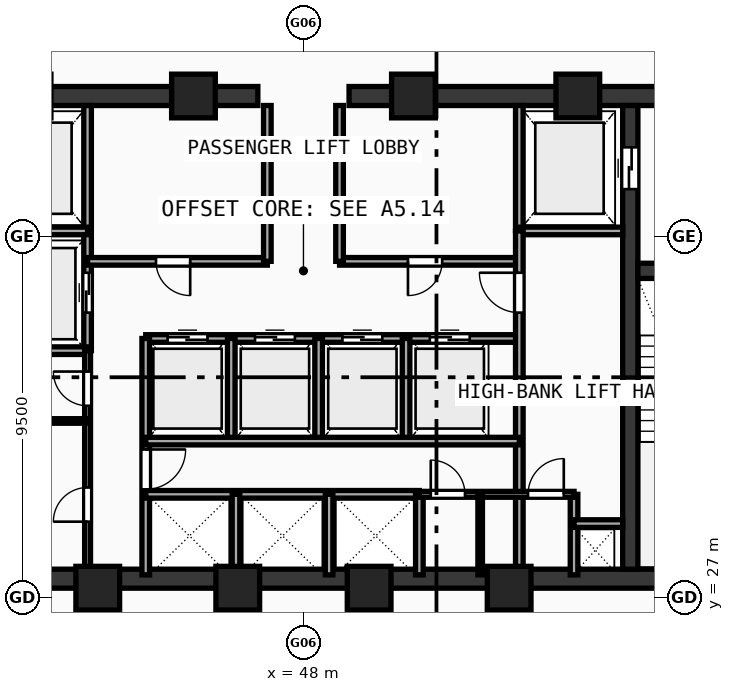
"""IFC4 building model, lengths in metres.
Left out: names, types, materials, properties, quantities, classifications, styles, units other than length and angle.
Written with IfcOpenShell. Run it as: python <this file> out.ifc"""

import sys

from ifc_helpers import new_model, si_unit, direction, frame, frame_2d, origin, origin_with_axes, origin_2d, place, context, subcontext, project, spatial, rectangle, hollow_rectangle, extrude, source, transform, mapped, element, fill, save


model = new_model("IFC4")
c1 = context("Model", 3, precision=1e-05, world=origin(), true_north=direction((0.0, 1.0)))
c2 = subcontext(c1, "Body", "Model", "MODEL_VIEW")
j1 = project(units=[si_unit("LENGTHUNIT", "METRE"), si_unit("PLANEANGLEUNIT", "RADIAN")], contexts=[c1])
p1 = place(None, origin())
s1 = spatial("IfcSite", under=j1, at=p1, CompositionType="ELEMENT")
p2 = place(p1, origin())
s2 = spatial("IfcBuilding", under=s1, at=p2, CompositionType="ELEMENT")
p3 = place(p2, frame((0.0, 0.0, 203.76)))
s3 = spatial("IfcBuildingStorey", under=s2, at=p3, CompositionType="ELEMENT", Elevation=203.76)
p4 = place(p3, frame((35.55, 27.5, 0.0), z_axis=(0.0, 0.0, 1.0), x_axis=(1.0, 0.0, 0.0)))
e1 = element("IfcWall", 1, at=p4, inside=s3, PredefinedType="SHEAR", context=c2, shape_type="SweptSolid", body=[
    extrude(rectangle(XDim=24.9, YDim=0.5, at=frame_2d((12.45, 0.0))), origin(), (0.0, 0.0, 1.0), 3.54),
])
p5 = place(p3, frame((35.55, 40.2, 0.0), z_axis=(0.0, 0.0, 1.0), x_axis=(1.0, 0.0, 0.0)))
e2 = element("IfcWall", 2, at=p5, inside=s3, PredefinedType="SHEAR", context=c2, shape_type="SweptSolid", body=[
    extrude(rectangle(XDim=11.25, YDim=0.5, at=frame_2d((5.625, 0.0))), origin(), (0.0, 0.0, 1.0), 3.54),
])
p6 = place(p5, frame((1.6, 0.0, 0.0)))
e3 = element("IfcOpeningElement", 3, at=p6, cuts=e2, PredefinedType="OPENING", context=c2, shape_type="SweptSolid", body=[
    extrude(rectangle(XDim=1.05, YDim=2.1, at=frame_2d((0.525, 1.05))), frame((0.0, 0.26, 0.0), z_axis=(0.0, -1.0, 0.0), x_axis=(1.0, 0.0, 0.0)), (0.0, 0.0, 1.0), 0.52),
])
p7 = place(p3, frame((49.2, 40.2, 0.0), z_axis=(0.0, 0.0, 1.0), x_axis=(1.0, 0.0, 0.0)))
e4 = element("IfcWall", 4, at=p7, inside=s3, PredefinedType="SHEAR", context=c2, shape_type="SweptSolid", body=[
    extrude(rectangle(XDim=11.25, YDim=0.5, at=frame_2d((5.625, 0.0))), origin(), (0.0, 0.0, 1.0), 3.54),
])
p8 = place(p7, frame((8.6, 0.0, 0.0)))
e5 = element("IfcOpeningElement", 5, at=p8, cuts=e4, PredefinedType="OPENING", context=c2, shape_type="SweptSolid", body=[
    extrude(rectangle(XDim=1.05, YDim=2.1, at=frame_2d((0.525, 1.05))), frame((0.0, 0.26, 0.0), z_axis=(0.0, -1.0, 0.0), x_axis=(1.0, 0.0, 0.0)), (0.0, 0.0, 1.0), 0.52),
])
p9 = place(p3, frame((56.6, 27.75, 0.0), z_axis=(0.0, 0.0, 1.0), x_axis=(0.0, 1.0, 0.0)))
e6 = element("IfcWall", 6, at=p9, inside=s3, PredefinedType="SHEAR", context=c2, shape_type="SweptSolid", body=[
    extrude(rectangle(XDim=12.2, YDim=0.4, at=frame_2d((6.1, 0.0))), origin(), (0.0, 0.0, 1.0), 3.54),
])
p10 = place(p9, frame((10.0, 0.0, 0.0)))
e7 = element("IfcOpeningElement", 7, at=p10, cuts=e6, PredefinedType="OPENING", context=c2, shape_type="SweptSolid", body=[
    extrude(rectangle(XDim=1.1, YDim=2.1, at=frame_2d((0.55, 1.05))), frame((0.0, 0.21, 0.0), z_axis=(0.0, -1.0, 0.0), x_axis=(1.0, 0.0, 0.0)), (0.0, 0.0, 1.0), 0.42),
])
p11 = place(p3, frame((56.8, 35.6, 0.0), z_axis=(0.0, 0.0, 1.0), x_axis=(1.0, 0.0, 0.0)))
e8 = element("IfcWall", 8, at=p11, inside=s3, PredefinedType="SHEAR", context=c2, shape_type="SweptSolid", body=[
    extrude(rectangle(XDim=3.15, YDim=0.4, at=frame_2d((1.575, 0.0))), origin(), (0.0, 0.0, 1.0), 3.54),
])
p12 = place(p11, frame((1.02, 0.0, 0.0)))
e9 = element("IfcOpeningElement", 9, at=p12, cuts=e8, PredefinedType="OPENING", context=c2, shape_type="SweptSolid", body=[
    extrude(rectangle(XDim=1.05, YDim=2.1, at=frame_2d((0.525, 1.05))), frame((0.0, 0.21, 0.0), z_axis=(0.0, -1.0, 0.0), x_axis=(1.0, 0.0, 0.0)), (0.0, 0.0, 1.0), 0.42),
])
m1 = source(origin(), c2, "Body", "SweptSolid", [
    extrude(hollow_rectangle(XDim=1.15, YDim=1.15, WallThickness=0.048, at=origin_2d()), origin(), (0.0, 0.0, 1.0), 3.8),
])
for number, where, z_axis, x_axis in (
    (10, (42.588, 27.25, -0.26), (0.0, 0.0, 1.0), (1.0, 0.0, 0.0)),
    (11, (46.272, 27.25, -0.26), (0.0, 0.0, 1.0), (1.0, 0.0, 0.0)),
    (12, (49.729, 27.25, -0.26), (0.0, 0.0, 1.0), (1.0, 0.0, 0.0)),
    (13, (53.412, 27.25, -0.26), (0.0, 0.0, 1.0), (1.0, 0.0, 0.0)),
    (14, (55.219, 40.2, -0.26), (0.0, 0.0, 1.0), (1.0, 0.0, 0.0)),
    (15, (50.894, 40.2, -0.26), (0.0, 0.0, 1.0), (1.0, 0.0, 0.0)),
    (16, (45.106, 40.2, -0.26), (0.0, 0.0, 1.0), (1.0, 0.0, 0.0)),
):
    element("IfcColumn", number, at=place(p3, frame(where, z_axis=z_axis, x_axis=x_axis)), inside=s3, PredefinedType="COLUMN", context=c2, shape_type="MappedRepresentation", body=[
        mapped(m1, transform((0.0, 0.0, 0.0), scale=1.0)),
    ])
p13 = place(p3, frame((42.32, 33.5, 0.0), z_axis=(0.0, 0.0, 1.0), x_axis=(0.0, 1.0, 0.0)))
e17 = element("IfcWall", 17, at=p13, inside=s3, PredefinedType="SOLIDWALL", context=c2, shape_type="SweptSolid", body=[
    extrude(rectangle(XDim=6.45, YDim=0.2, at=frame_2d((3.225, 0.0))), origin(), (0.0, 0.0, 1.0), 3.54),
])
p14 = place(p13, frame((1.0, 0.0, 0.0)))
e18 = element("IfcOpeningElement", 18, at=p14, cuts=e17, PredefinedType="OPENING", context=c2, shape_type="SweptSolid", body=[
    extrude(rectangle(XDim=1.05, YDim=2.1, at=frame_2d((0.525, 1.05))), frame((0.0, 0.11, 0.0), z_axis=(0.0, -1.0, 0.0), x_axis=(1.0, 0.0, 0.0)), (0.0, 0.0, 1.0), 0.22),
])
for number, where, z_axis, x_axis in (
    (19, (39.6, 36.65, 0.0), (0.0, 0.0, 1.0), (1.0, 0.0, 0.0)),
    (20, (39.6, 33.5, 0.0), (0.0, 0.0, 1.0), (1.0, 0.0, 0.0)),
):
    element("IfcWall", number, at=place(p3, frame(where, z_axis=z_axis, x_axis=x_axis)), inside=s3, PredefinedType="SOLIDWALL", context=c2, shape_type="SweptSolid", body=[
        extrude(rectangle(XDim=2.72, YDim=0.2, at=frame_2d((1.36, 0.0))), origin(), (0.0, 0.0, 1.0), 3.54),
    ])
p15 = place(p3, frame((53.68, 36.65, 0.0), z_axis=(0.0, 0.0, 1.0), x_axis=(0.0, 1.0, 0.0)))
e21 = element("IfcWall", 21, at=p15, inside=s3, PredefinedType="SOLIDWALL", context=c2, shape_type="SweptSolid", body=[
    extrude(rectangle(XDim=3.3, YDim=0.2, at=frame_2d((1.65, 0.0))), origin(), (0.0, 0.0, 1.0), 3.54),
])
p16 = place(p3, frame((53.68, 36.65, 0.0), z_axis=(0.0, 0.0, 1.0), x_axis=(1.0, 0.0, 0.0)))
e22 = element("IfcWall", 22, at=p16, inside=s3, PredefinedType="SOLIDWALL", context=c2, shape_type="SweptSolid", body=[
    extrude(rectangle(XDim=2.72, YDim=0.2, at=frame_2d((1.36, 0.0))), origin(), (0.0, 0.0, 1.0), 3.54),
])
p17 = place(p3, frame((42.32, 35.85, 0.0), z_axis=(0.0, 0.0, 1.0), x_axis=(1.0, 0.0, 0.0)))
e23 = element("IfcWall", 23, at=p17, inside=s3, PredefinedType="SOLIDWALL", context=c2, shape_type="SweptSolid", body=[
    extrude(rectangle(XDim=4.73, YDim=0.2, at=frame_2d((2.365, 0.0))), origin(), (0.0, 0.0, 1.0), 3.54),
])
p18 = place(p17, frame((1.8, 0.0, 0.0)))
e24 = element("IfcOpeningElement", 24, at=p18, cuts=e23, PredefinedType="OPENING", context=c2, shape_type="SweptSolid", body=[
    extrude(rectangle(XDim=0.9, YDim=2.1, at=frame_2d((0.45, 1.05))), frame((0.0, 0.11, 0.0), z_axis=(0.0, -1.0, 0.0), x_axis=(1.0, 0.0, 0.0)), (0.0, 0.0, 1.0), 0.22),
])
p19 = place(p3, frame((48.95, 35.85, 0.0), z_axis=(0.0, 0.0, 1.0), x_axis=(1.0, 0.0, 0.0)))
e25 = element("IfcWall", 25, at=p19, inside=s3, PredefinedType="SOLIDWALL", context=c2, shape_type="SweptSolid", body=[
    extrude(rectangle(XDim=4.73, YDim=0.2, at=frame_2d((2.365, 0.0))), origin(), (0.0, 0.0, 1.0), 3.54),
])
p20 = place(p19, frame((1.8, 0.0, 0.0)))
e26 = element("IfcOpeningElement", 26, at=p20, cuts=e25, PredefinedType="OPENING", context=c2, shape_type="SweptSolid", body=[
    extrude(rectangle(XDim=0.9, YDim=2.1, at=frame_2d((0.45, 1.05))), frame((0.0, 0.11, 0.0), z_axis=(0.0, -1.0, 0.0), x_axis=(1.0, 0.0, 0.0)), (0.0, 0.0, 1.0), 0.22),
])
for number, where, z_axis, x_axis in (
    (27, (47.05, 35.85, 0.0), (0.0, 0.0, 1.0), (0.0, 1.0, 0.0)),
    (28, (48.95, 35.85, 0.0), (0.0, 0.0, 1.0), (0.0, 1.0, 0.0)),
):
    element("IfcWall", number, at=place(p3, frame(where, z_axis=z_axis, x_axis=x_axis)), inside=s3, PredefinedType="SOLIDWALL", context=c2, shape_type="SweptSolid", body=[
        extrude(rectangle(XDim=4.1, YDim=0.2, at=frame_2d((2.05, 0.0))), origin(), (0.0, 0.0, 1.0), 3.54),
    ])
p21 = place(p3, frame((43.85, 33.82, 0.0), z_axis=(0.0, 0.0, 1.0), x_axis=(1.0, 0.0, 0.0)))
e29 = element("IfcWall", 29, at=p21, inside=s3, PredefinedType="SOLIDWALL", context=c2, shape_type="SweptSolid", body=[
    extrude(rectangle(XDim=9.83, YDim=0.2, at=frame_2d((4.915, 0.0))), origin(), (0.0, 0.0, 1.0), 3.54),
])
p22 = place(p21, frame((0.575, 0.0, 0.0)))
e30 = element("IfcOpeningElement", 30, at=p22, cuts=e29, PredefinedType="OPENING", context=c2, shape_type="SweptSolid", body=[
    extrude(rectangle(XDim=1.05, YDim=2.1, at=frame_2d((0.525, 1.05))), frame((0.0, 0.11, 0.0), z_axis=(0.0, -1.0, 0.0), x_axis=(1.0, 0.0, 0.0)), (0.0, 0.0, 1.0), 0.22),
])
p23 = place(p21, frame((2.875, 0.0, 0.0)))
e31 = element("IfcOpeningElement", 31, at=p23, cuts=e29, PredefinedType="OPENING", context=c2, shape_type="SweptSolid", body=[
    extrude(rectangle(XDim=1.05, YDim=2.1, at=frame_2d((0.525, 1.05))), frame((0.0, 0.11, 0.0), z_axis=(0.0, -1.0, 0.0), x_axis=(1.0, 0.0, 0.0)), (0.0, 0.0, 1.0), 0.22),
])
p24 = place(p21, frame((5.175, 0.0, 0.0)))
e32 = element("IfcOpeningElement", 32, at=p24, cuts=e29, PredefinedType="OPENING", context=c2, shape_type="SweptSolid", body=[
    extrude(rectangle(XDim=1.05, YDim=2.1, at=frame_2d((0.525, 1.05))), frame((0.0, 0.11, 0.0), z_axis=(0.0, -1.0, 0.0), x_axis=(1.0, 0.0, 0.0)), (0.0, 0.0, 1.0), 0.22),
])
p25 = place(p21, frame((7.475, 0.0, 0.0)))
e33 = element("IfcOpeningElement", 33, at=p25, cuts=e29, PredefinedType="OPENING", context=c2, shape_type="SweptSolid", body=[
    extrude(rectangle(XDim=1.05, YDim=2.1, at=frame_2d((0.525, 1.05))), frame((0.0, 0.11, 0.0), z_axis=(0.0, -1.0, 0.0), x_axis=(1.0, 0.0, 0.0)), (0.0, 0.0, 1.0), 0.22),
])
p26 = place(p3, frame((43.85, 27.6, 0.0), z_axis=(0.0, 0.0, 1.0), x_axis=(0.0, 1.0, 0.0)))
e34 = element("IfcWall", 34, at=p26, inside=s3, PredefinedType="SOLIDWALL", context=c2, shape_type="SweptSolid", body=[
    extrude(rectangle(XDim=6.22, YDim=0.2, at=frame_2d((3.11, 0.0))), origin(), (0.0, 0.0, 1.0), 3.54),
])
p27 = place(p26, frame((2.25, 0.0, 0.0)))
e35 = element("IfcOpeningElement", 35, at=p27, cuts=e34, PredefinedType="OPENING", context=c2, shape_type="SweptSolid", body=[
    extrude(rectangle(XDim=1.05, YDim=2.1, at=frame_2d((0.525, 1.05))), frame((0.0, 0.11, 0.0), z_axis=(0.0, -1.0, 0.0), x_axis=(1.0, 0.0, 0.0)), (0.0, 0.0, 1.0), 0.22),
])
p28 = place(p3, frame((53.68, 27.6, 0.0), z_axis=(0.0, 0.0, 1.0), x_axis=(0.0, 1.0, 0.0)))
e36 = element("IfcWall", 36, at=p28, inside=s3, PredefinedType="SOLIDWALL", context=c2, shape_type="SweptSolid", body=[
    extrude(rectangle(XDim=9.05, YDim=0.2, at=frame_2d((4.525, 0.0))), origin(), (0.0, 0.0, 1.0), 3.54),
])
p29 = place(p28, frame((6.9, 0.0, 0.0)))
e37 = element("IfcOpeningElement", 37, at=p29, cuts=e36, PredefinedType="OPENING", context=c2, shape_type="SweptSolid", body=[
    extrude(rectangle(XDim=1.05, YDim=2.1, at=frame_2d((0.525, 1.05))), frame((0.0, 0.11, 0.0), z_axis=(0.0, -1.0, 0.0), x_axis=(1.0, 0.0, 0.0)), (0.0, 0.0, 1.0), 0.22),
])
for number, where, z_axis, x_axis in (
    (38, (46.1, 31.12, 0.0), (0.0, 0.0, 1.0), (0.0, 1.0, 0.0)),
    (39, (48.4, 31.12, 0.0), (0.0, 0.0, 1.0), (0.0, 1.0, 0.0)),
    (40, (50.7, 31.12, 0.0), (0.0, 0.0, 1.0), (0.0, 1.0, 0.0)),
):
    element("IfcWall", number, at=place(p3, frame(where, z_axis=z_axis, x_axis=x_axis)), inside=s3, PredefinedType="SOLIDWALL", context=c2, shape_type="SweptSolid", body=[
        extrude(rectangle(XDim=2.7, YDim=0.2, at=frame_2d((1.35, 0.0))), origin(), (0.0, 0.0, 1.0), 3.54),
    ])
p30 = place(p3, frame((43.85, 29.72, 0.0), z_axis=(0.0, 0.0, 1.0), x_axis=(1.0, 0.0, 0.0)))
e41 = element("IfcWall", 41, at=p30, inside=s3, PredefinedType="SOLIDWALL", context=c2, shape_type="SweptSolid", body=[
    extrude(rectangle(XDim=7.2, YDim=0.2, at=frame_2d((3.6, 0.0))), origin(), (0.0, 0.0, 1.0), 3.54),
])
p31 = place(p3, frame((51.05, 27.6, 0.0), z_axis=(0.0, 0.0, 1.0), x_axis=(0.0, 1.0, 0.0)))
e42 = element("IfcWall", 42, at=p31, inside=s3, PredefinedType="SOLIDWALL", context=c2, shape_type="SweptSolid", body=[
    extrude(rectangle(XDim=2.12, YDim=0.2, at=frame_2d((1.06, 0.0))), origin(), (0.0, 0.0, 1.0), 3.54),
])
p32 = place(p3, frame((43.85, 31.12, 0.0), z_axis=(0.0, 0.0, 1.0), x_axis=(1.0, 0.0, 0.0)))
e43 = element("IfcWall", 43, at=p32, inside=s3, PredefinedType="SOLIDWALL", context=c2, shape_type="SweptSolid", body=[
    extrude(rectangle(XDim=9.83, YDim=0.2, at=frame_2d((4.915, 0.0))), origin(), (0.0, 0.0, 1.0), 3.54),
])
for number, where, z_axis, x_axis in (
    (44, (46.225, 27.6, 0.0), (0.0, 0.0, 1.0), (0.0, 1.0, 0.0)),
    (45, (48.675, 27.6, 0.0), (0.0, 0.0, 1.0), (0.0, 1.0, 0.0)),
    (46, (55.12, 27.6, 0.0), (0.0, 0.0, 1.0), (0.0, 1.0, 0.0)),
):
    element("IfcWall", number, at=place(p3, frame(where, z_axis=z_axis, x_axis=x_axis)), inside=s3, PredefinedType="SOLIDWALL", context=c2, shape_type="SweptSolid", body=[
        extrude(rectangle(XDim=2.12, YDim=0.2, at=frame_2d((1.06, 0.0))), origin(), (0.0, 0.0, 1.0), 3.54),
    ])
p33 = place(p3, frame((55.12, 28.95, 0.0), z_axis=(0.0, 0.0, 1.0), x_axis=(1.0, 0.0, 0.0)))
e47 = element("IfcWall", 47, at=p33, inside=s3, PredefinedType="SOLIDWALL", context=c2, shape_type="SweptSolid", body=[
    extrude(rectangle(XDim=1.28, YDim=0.2, at=frame_2d((0.64, 0.0))), origin(), (0.0, 0.0, 1.0), 3.54),
])
p34 = place(p3, frame((42.32, 27.6, 0.0), z_axis=(0.0, 0.0, 1.0), x_axis=(0.0, 1.0, 0.0)))
e48 = element("IfcWall", 48, at=p34, inside=s3, PredefinedType="PARTITIONING", context=c2, shape_type="SweptSolid", body=[
    extrude(rectangle(XDim=5.9, YDim=0.155, at=frame_2d((2.95, 0.0))), origin(), (0.0, 0.0, 1.0), 3.54),
])
p35 = place(p34, frame((1.4, 0.0, 0.0)))
e49 = element("IfcOpeningElement", 49, at=p35, cuts=e48, PredefinedType="OPENING", context=c2, shape_type="SweptSolid", body=[
    extrude(rectangle(XDim=0.9, YDim=2.1, at=frame_2d((0.45, 1.05))), frame((0.0, 0.087, 0.0), z_axis=(0.0, -1.0, 0.0), x_axis=(1.0, 0.0, 0.0)), (0.0, 0.0, 1.0), 0.175),
])
p36 = place(p34, frame((4.45, 0.0, 0.0)))
e50 = element("IfcOpeningElement", 50, at=p36, cuts=e48, PredefinedType="OPENING", context=c2, shape_type="SweptSolid", body=[
    extrude(rectangle(XDim=0.9, YDim=2.1, at=frame_2d((0.45, 1.05))), frame((0.0, 0.087, 0.0), z_axis=(0.0, -1.0, 0.0), x_axis=(1.0, 0.0, 0.0)), (0.0, 0.0, 1.0), 0.175),
])
p37 = place(p3, frame((51.05, 29.72, 0.0), z_axis=(0.0, 0.0, 1.0), x_axis=(1.0, 0.0, 0.0)))
e51 = element("IfcWall", 51, at=p37, inside=s3, PredefinedType="PARTITIONING", context=c2, shape_type="SweptSolid", body=[
    extrude(rectangle(XDim=4.07, YDim=0.155, at=frame_2d((2.035, 0.0))), origin(), (0.0, 0.0, 1.0), 3.54),
])
p38 = place(p37, frame((0.3, 0.0, 0.0)))
e52 = element("IfcOpeningElement", 52, at=p38, cuts=e51, PredefinedType="OPENING", context=c2, shape_type="SweptSolid", body=[
    extrude(rectangle(XDim=0.9, YDim=2.1, at=frame_2d((0.45, 1.05))), frame((0.0, 0.087, 0.0), z_axis=(0.0, -1.0, 0.0), x_axis=(1.0, 0.0, 0.0)), (0.0, 0.0, 1.0), 0.175),
])
p39 = place(p37, frame((2.86, 0.0, 0.0)))
e53 = element("IfcOpeningElement", 53, at=p39, cuts=e51, PredefinedType="OPENING", context=c2, shape_type="SweptSolid", body=[
    extrude(rectangle(XDim=0.94, YDim=2.1, at=frame_2d((0.47, 1.05))), frame((0.0, 0.087, 0.0), z_axis=(0.0, -1.0, 0.0), x_axis=(1.0, 0.0, 0.0)), (0.0, 0.0, 1.0), 0.175),
])
p40 = place(p3, frame((39.6, 31.65, 0.0), z_axis=(0.0, 0.0, 1.0), x_axis=(1.0, 0.0, 0.0)))
e54 = element("IfcWall", 54, at=p40, inside=s3, PredefinedType="PARTITIONING", context=c2, shape_type="SweptSolid", body=[
    extrude(rectangle(XDim=2.72, YDim=0.12, at=frame_2d((1.36, 0.0))), origin(), (0.0, 0.0, 1.0), 3.54),
])
p41 = place(p3, frame((52.65, 27.6, 0.0), z_axis=(0.0, 0.0, 1.0), x_axis=(0.0, 1.0, 0.0)))
e55 = element("IfcWall", 55, at=p41, inside=s3, PredefinedType="PARTITIONING", context=c2, shape_type="SweptSolid", body=[
    extrude(rectangle(XDim=2.12, YDim=0.12, at=frame_2d((1.06, 0.0))), origin(), (0.0, 0.0, 1.0), 3.54),
])
m2 = source(origin(), c2, "Body", "SweptSolid", [
    extrude(rectangle(XDim=1.1, YDim=2.1, at=frame_2d((0.55, 1.05))), frame((0.0, 0.025, 0.0), z_axis=(0.0, -1.0, 0.0), x_axis=(1.0, 0.0, 0.0)), (0.0, 0.0, 1.0), 0.05),
])
p42 = place(p10, origin_with_axes())
e56 = element("IfcDoor", 56, at=p42, inside=s3, OperationType="DOUBLE_DOOR_SLIDING", PredefinedType="DOOR", context=c2, shape_type="MappedRepresentation", body=[
    mapped(m2, transform((0.0, 0.0, 0.0), scale=1.0)),
])
fill(e7, e56)
m3 = source(origin(), c2, "Body", "SweptSolid", [
    extrude(rectangle(XDim=1.05, YDim=2.1, at=frame_2d((0.525, 1.05))), frame((0.0, 0.025, 0.0), z_axis=(0.0, -1.0, 0.0), x_axis=(1.0, 0.0, 0.0)), (0.0, 0.0, 1.0), 0.05),
])
p43 = place(p14, origin_with_axes())
e57 = element("IfcDoor", 57, at=p43, inside=s3, OperationType="DOUBLE_DOOR_SLIDING", PredefinedType="DOOR", context=c2, shape_type="MappedRepresentation", body=[
    mapped(m3, transform((0.0, 0.0, 0.0), scale=1.0)),
])
fill(e18, e57)
m4 = source(origin(), c2, "Body", "SweptSolid", [
    extrude(rectangle(XDim=0.9, YDim=2.1, at=frame_2d((0.45, 1.05))), frame((0.0, 0.025, 0.0), z_axis=(0.0, -1.0, 0.0), x_axis=(1.0, 0.0, 0.0)), (0.0, 0.0, 1.0), 0.05),
])
p44 = place(p18, frame((0.9, 0.0, 0.0), z_axis=(0.0, 0.0, 1.0), x_axis=(-1.0, 0.0, 0.0)))
e58 = element("IfcDoor", 58, at=p44, inside=s3, OperationType="SINGLE_SWING_LEFT", PredefinedType="DOOR", context=c2, shape_type="MappedRepresentation", body=[
    mapped(m4, transform((0.0, 0.0, 0.0), scale=1.0)),
])
fill(e24, e58)
p45 = place(p20, frame((0.9, 0.0, 0.0), z_axis=(0.0, 0.0, 1.0), x_axis=(-1.0, 0.0, 0.0)))
e59 = element("IfcDoor", 59, at=p45, inside=s3, OperationType="SINGLE_SWING_RIGHT", PredefinedType="DOOR", context=c2, shape_type="MappedRepresentation", body=[
    mapped(m4, transform((0.0, 0.0, 0.0), scale=1.0)),
])
fill(e26, e59)
p46 = place(p22, origin_with_axes())
e60 = element("IfcDoor", 60, at=p46, inside=s3, OperationType="DOUBLE_DOOR_SLIDING", PredefinedType="DOOR", context=c2, shape_type="MappedRepresentation", body=[
    mapped(m3, transform((0.0, 0.0, 0.0), scale=1.0)),
])
fill(e30, e60)
p47 = place(p23, origin_with_axes())
e61 = element("IfcDoor", 61, at=p47, inside=s3, OperationType="DOUBLE_DOOR_SLIDING", PredefinedType="DOOR", context=c2, shape_type="MappedRepresentation", body=[
    mapped(m3, transform((0.0, 0.0, 0.0), scale=1.0)),
])
fill(e31, e61)
p48 = place(p24, origin_with_axes())
e62 = element("IfcDoor", 62, at=p48, inside=s3, OperationType="DOUBLE_DOOR_SLIDING", PredefinedType="DOOR", context=c2, shape_type="MappedRepresentation", body=[
    mapped(m3, transform((0.0, 0.0, 0.0), scale=1.0)),
])
fill(e32, e62)
p49 = place(p25, origin_with_axes())
e63 = element("IfcDoor", 63, at=p49, inside=s3, OperationType="DOUBLE_DOOR_SLIDING", PredefinedType="DOOR", context=c2, shape_type="MappedRepresentation", body=[
    mapped(m3, transform((0.0, 0.0, 0.0), scale=1.0)),
])
fill(e33, e63)
p50 = place(p27, frame((1.05, 0.0, 0.0), z_axis=(0.0, 0.0, 1.0), x_axis=(-1.0, 0.0, 0.0)))
e64 = element("IfcDoor", 64, at=p50, inside=s3, OperationType="SINGLE_SWING_LEFT", PredefinedType="DOOR", context=c2, shape_type="MappedRepresentation", body=[
    mapped(m3, transform((0.0, 0.0, 0.0), scale=1.0)),
])
fill(e35, e64)
p51 = place(p29, origin_with_axes())
e65 = element("IfcDoor", 65, at=p51, inside=s3, OperationType="SINGLE_SWING_RIGHT", PredefinedType="DOOR", context=c2, shape_type="MappedRepresentation", body=[
    mapped(m3, transform((0.0, 0.0, 0.0), scale=1.0)),
])
fill(e37, e65)
p52 = place(p35, origin_with_axes())
e66 = element("IfcDoor", 66, at=p52, inside=s3, OperationType="SINGLE_SWING_LEFT", PredefinedType="DOOR", context=c2, shape_type="MappedRepresentation", body=[
    mapped(m4, transform((0.0, 0.0, 0.0), scale=1.0)),
])
fill(e49, e66)
p53 = place(p36, origin_with_axes())
e67 = element("IfcDoor", 67, at=p53, inside=s3, OperationType="SINGLE_SWING_RIGHT", PredefinedType="DOOR", context=c2, shape_type="MappedRepresentation", body=[
    mapped(m4, transform((0.0, 0.0, 0.0), scale=1.0)),
])
fill(e50, e67)
p54 = place(p38, origin_with_axes())
e68 = element("IfcDoor", 68, at=p54, inside=s3, OperationType="SINGLE_SWING_LEFT", PredefinedType="DOOR", context=c2, shape_type="MappedRepresentation", body=[
    mapped(m4, transform((0.0, 0.0, 0.0), scale=1.0)),
])
fill(e52, e68)
m5 = source(origin(), c2, "Body", "SweptSolid", [
    extrude(rectangle(XDim=0.94, YDim=2.1, at=frame_2d((0.47, 1.05))), frame((0.0, 0.025, 0.0), z_axis=(0.0, -1.0, 0.0), x_axis=(1.0, 0.0, 0.0)), (0.0, 0.0, 1.0), 0.05),
])
p55 = place(p39, origin_with_axes())
e69 = element("IfcDoor", 69, at=p55, inside=s3, OperationType="SINGLE_SWING_RIGHT", PredefinedType="DOOR", context=c2, shape_type="MappedRepresentation", body=[
    mapped(m5, transform((0.0, 0.0, 0.0), scale=1.0)),
])
fill(e53, e69)
save(model, sys.argv[1])
